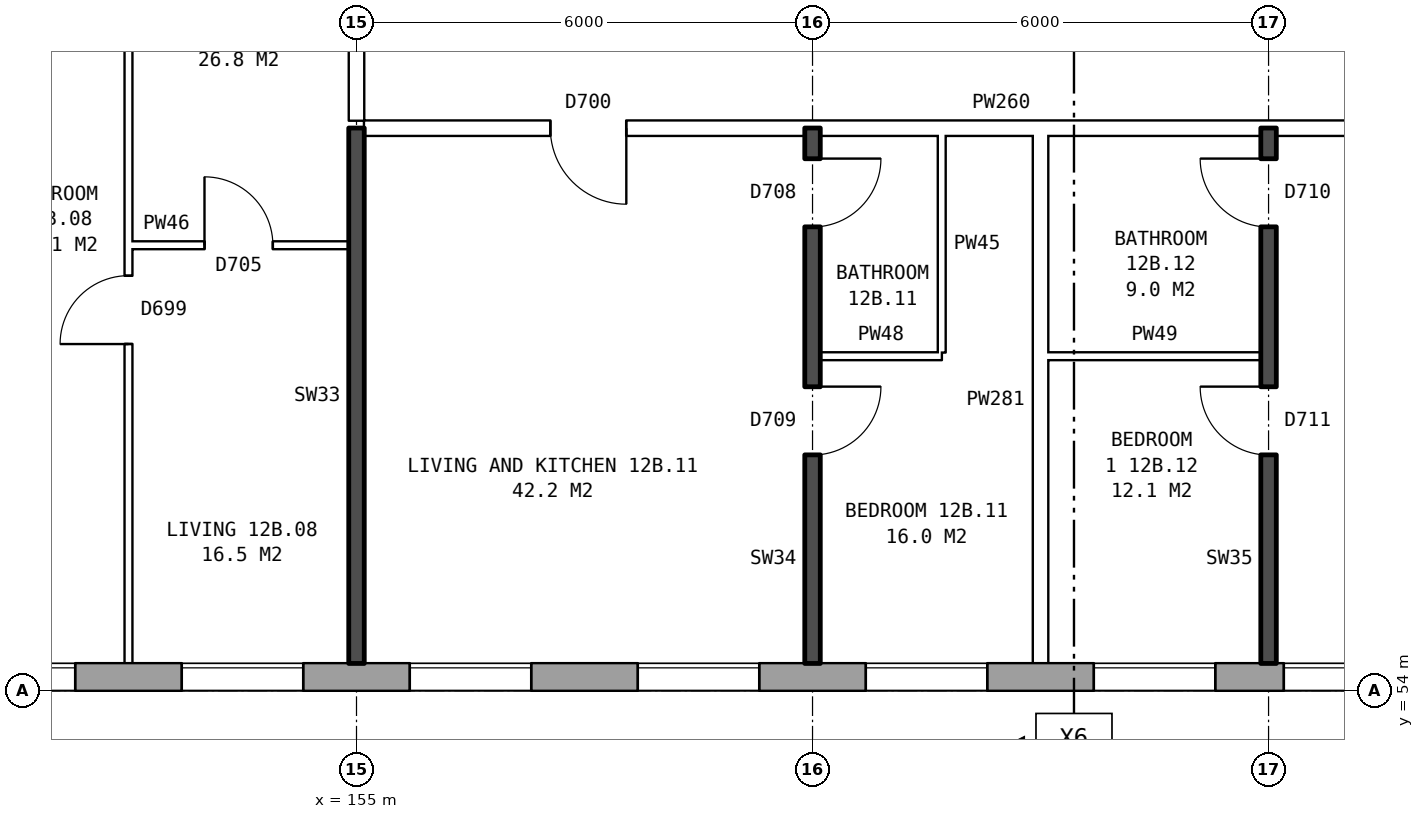
"""IFC4 building model, lengths in metres.
Left out: names, types, materials, properties, quantities, classifications, styles, units other than length and angle.
Written with IfcOpenShell. Run it as: python <this file> out.ifc"""

import sys

from ifc_helpers import new_model, si_unit, direction, frame, frame_2d, origin, place, context, subcontext, project, spatial, rectangle, extrude, element, fill, save


model = new_model("IFC4")
c1 = context("Model", 3, precision=1e-05, world=origin(), true_north=direction((0.0, 1.0)))
c2 = subcontext(c1, "Body", "Model", "MODEL_VIEW")
j1 = project(units=[si_unit("LENGTHUNIT", "METRE"), si_unit("PLANEANGLEUNIT", "RADIAN")], contexts=[c1])
p1 = place(None, origin())
s1 = spatial("IfcSite", under=j1, at=p1, CompositionType="ELEMENT")
p2 = place(p1, origin())
s2 = spatial("IfcBuilding", under=s1, at=p2, CompositionType="ELEMENT")
p3 = place(p2, frame((0.0, 0.0, 47.4)))
s3 = spatial("IfcBuildingStorey", under=s2, at=p3, CompositionType="ELEMENT", Elevation=47.4)
p4 = place(p3, frame((134.075, 54.18, 0.0), z_axis=(0.0, 0.0, 1.0), x_axis=(1.0, 0.0, 0.0)))
e1 = element("IfcWall", 1, at=p4, inside=s3, PredefinedType="STANDARD", context=c2, shape_type="SweptSolid", body=[
    extrude(rectangle(XDim=39.351, YDim=0.36, at=frame_2d((19.675, 0.0))), origin(), (0.0, 0.0, 1.0), 2.85),
])
p5 = place(p4, frame((0.3, 0.0, 0.8)))
e2 = element("IfcOpeningElement", 2, at=p5, cuts=e1, PredefinedType="OPENING", context=c2, shape_type="SweptSolid", body=[
    extrude(rectangle(XDim=1.2, YDim=1.8, at=frame_2d((0.6, 0.9))), frame((0.0, 0.19, 0.0), z_axis=(0.0, -1.0, 0.0), x_axis=(1.0, 0.0, 0.0)), (0.0, 0.0, 1.0), 0.38),
])
p6 = place(p4, frame((3.925, 0.0, 0.8)))
e3 = element("IfcOpeningElement", 3, at=p6, cuts=e1, PredefinedType="OPENING", context=c2, shape_type="SweptSolid", body=[
    extrude(rectangle(XDim=0.8, YDim=0.9, at=frame_2d((0.4, 0.45))), frame((0.0, 0.19, 0.0), z_axis=(0.0, -1.0, 0.0), x_axis=(1.0, 0.0, 0.0)), (0.0, 0.0, 1.0), 0.38),
])
p7 = place(p4, frame((6.625, 0.0, 0.8)))
e4 = element("IfcOpeningElement", 4, at=p7, cuts=e1, PredefinedType="OPENING", context=c2, shape_type="SweptSolid", body=[
    extrude(rectangle(XDim=1.6, YDim=1.8, at=frame_2d((0.8, 0.9))), frame((0.0, 0.19, 0.0), z_axis=(0.0, -1.0, 0.0), x_axis=(1.0, 0.0, 0.0)), (0.0, 0.0, 1.0), 0.38),
])
p8 = place(p4, frame((9.625, 0.0, 0.8)))
e5 = element("IfcOpeningElement", 5, at=p8, cuts=e1, PredefinedType="OPENING", context=c2, shape_type="SweptSolid", body=[
    extrude(rectangle(XDim=1.6, YDim=1.8, at=frame_2d((0.8, 0.9))), frame((0.0, 0.19, 0.0), z_axis=(0.0, -1.0, 0.0), x_axis=(1.0, 0.0, 0.0)), (0.0, 0.0, 1.0), 0.38),
])
p9 = place(p4, frame((12.625, 0.0, 0.8)))
e6 = element("IfcOpeningElement", 6, at=p9, cuts=e1, PredefinedType="OPENING", context=c2, shape_type="SweptSolid", body=[
    extrude(rectangle(XDim=1.6, YDim=1.8, at=frame_2d((0.8, 0.9))), frame((0.0, 0.19, 0.0), z_axis=(0.0, -1.0, 0.0), x_axis=(1.0, 0.0, 0.0)), (0.0, 0.0, 1.0), 0.38),
])
p10 = place(p4, frame((15.625, 0.0, 0.8)))
e7 = element("IfcOpeningElement", 7, at=p10, cuts=e1, PredefinedType="OPENING", context=c2, shape_type="SweptSolid", body=[
    extrude(rectangle(XDim=1.6, YDim=1.8, at=frame_2d((0.8, 0.9))), frame((0.0, 0.19, 0.0), z_axis=(0.0, -1.0, 0.0), x_axis=(1.0, 0.0, 0.0)), (0.0, 0.0, 1.0), 0.38),
])
p11 = place(p4, frame((18.625, 0.0, 0.8)))
e8 = element("IfcOpeningElement", 8, at=p11, cuts=e1, PredefinedType="OPENING", context=c2, shape_type="SweptSolid", body=[
    extrude(rectangle(XDim=1.6, YDim=1.8, at=frame_2d((0.8, 0.9))), frame((0.0, 0.19, 0.0), z_axis=(0.0, -1.0, 0.0), x_axis=(1.0, 0.0, 0.0)), (0.0, 0.0, 1.0), 0.38),
])
p12 = place(p4, frame((21.625, 0.0, 0.8)))
e9 = element("IfcOpeningElement", 9, at=p12, cuts=e1, PredefinedType="OPENING", context=c2, shape_type="SweptSolid", body=[
    extrude(rectangle(XDim=1.6, YDim=1.8, at=frame_2d((0.8, 0.9))), frame((0.0, 0.19, 0.0), z_axis=(0.0, -1.0, 0.0), x_axis=(1.0, 0.0, 0.0)), (0.0, 0.0, 1.0), 0.38),
])
p13 = place(p4, frame((24.625, 0.0, 0.8)))
e10 = element("IfcOpeningElement", 10, at=p13, cuts=e1, PredefinedType="OPENING", context=c2, shape_type="SweptSolid", body=[
    extrude(rectangle(XDim=1.6, YDim=1.8, at=frame_2d((0.8, 0.9))), frame((0.0, 0.19, 0.0), z_axis=(0.0, -1.0, 0.0), x_axis=(1.0, 0.0, 0.0)), (0.0, 0.0, 1.0), 0.38),
])
p14 = place(p4, frame((27.625, 0.0, 0.8)))
e11 = element("IfcOpeningElement", 11, at=p14, cuts=e1, PredefinedType="OPENING", context=c2, shape_type="SweptSolid", body=[
    extrude(rectangle(XDim=1.6, YDim=1.8, at=frame_2d((0.8, 0.9))), frame((0.0, 0.19, 0.0), z_axis=(0.0, -1.0, 0.0), x_axis=(1.0, 0.0, 0.0)), (0.0, 0.0, 1.0), 0.38),
])
p15 = place(p4, frame((30.625, 0.0, 0.8)))
e12 = element("IfcOpeningElement", 12, at=p15, cuts=e1, PredefinedType="OPENING", context=c2, shape_type="SweptSolid", body=[
    extrude(rectangle(XDim=1.6, YDim=1.8, at=frame_2d((0.8, 0.9))), frame((0.0, 0.19, 0.0), z_axis=(0.0, -1.0, 0.0), x_axis=(1.0, 0.0, 0.0)), (0.0, 0.0, 1.0), 0.38),
])
p16 = place(p4, frame((33.125, 0.0, 0.8)))
e13 = element("IfcOpeningElement", 13, at=p16, cuts=e1, PredefinedType="OPENING", context=c2, shape_type="SweptSolid", body=[
    extrude(rectangle(XDim=1.2, YDim=1.8, at=frame_2d((0.6, 0.9))), frame((0.0, 0.19, 0.0), z_axis=(0.0, -1.0, 0.0), x_axis=(1.0, 0.0, 0.0)), (0.0, 0.0, 1.0), 0.38),
])
p17 = place(p4, frame((34.625, 0.0, 0.8)))
e14 = element("IfcOpeningElement", 14, at=p17, cuts=e1, PredefinedType="OPENING", context=c2, shape_type="SweptSolid", body=[
    extrude(rectangle(XDim=0.8, YDim=0.9, at=frame_2d((0.4, 0.45))), frame((0.0, 0.19, 0.0), z_axis=(0.0, -1.0, 0.0), x_axis=(1.0, 0.0, 0.0)), (0.0, 0.0, 1.0), 0.38),
])
p18 = place(p4, frame((1.8, 0.0, 1.6)))
e15 = element("IfcOpeningElement", 15, at=p18, cuts=e1, PredefinedType="OPENING", context=c2, shape_type="SweptSolid", body=[
    extrude(rectangle(XDim=0.8, YDim=0.9, at=frame_2d((0.4, 0.45))), frame((0.0, 0.19, 0.0), z_axis=(0.0, -1.0, 0.0), x_axis=(1.0, 0.0, 0.0)), (0.0, 0.0, 1.0), 0.38),
])
p19 = place(p4, frame((5.025, 0.0, 0.8)))
e16 = element("IfcOpeningElement", 16, at=p19, cuts=e1, PredefinedType="OPENING", context=c2, shape_type="SweptSolid", body=[
    extrude(rectangle(XDim=1.2, YDim=1.8, at=frame_2d((0.6, 0.9))), frame((0.0, 0.19, 0.0), z_axis=(0.0, -1.0, 0.0), x_axis=(1.0, 0.0, 0.0)), (0.0, 0.0, 1.0), 0.38),
])
p20 = place(p4, frame((36.625, 0.0, 1.7)))
e17 = element("IfcOpeningElement", 17, at=p20, cuts=e1, PredefinedType="OPENING", context=c2, shape_type="SweptSolid", body=[
    extrude(rectangle(XDim=0.8, YDim=0.9, at=frame_2d((0.4, 0.45))), frame((0.0, 0.19, 0.0), z_axis=(0.0, -1.0, 0.0), x_axis=(1.0, 0.0, 0.0)), (0.0, 0.0, 1.0), 0.38),
])
p21 = place(p4, frame((37.725, 0.0, 0.8)))
e18 = element("IfcOpeningElement", 18, at=p21, cuts=e1, PredefinedType="OPENING", context=c2, shape_type="SweptSolid", body=[
    extrude(rectangle(XDim=1.0, YDim=1.8, at=frame_2d((0.5, 0.9))), frame((0.0, 0.19, 0.0), z_axis=(0.0, -1.0, 0.0), x_axis=(1.0, 0.0, 0.0)), (0.0, 0.0, 1.0), 0.38),
])
p22 = place(p3, frame((161.1, 58.4, 0.0), z_axis=(0.0, 0.0, 1.0), x_axis=(1.0, 0.0, 0.0)))
e19 = element("IfcWall", 19, at=p22, inside=s3, PredefinedType="PARTITIONING", context=c2, shape_type="SweptSolid", body=[
    extrude(rectangle(XDim=1.6, YDim=0.1, at=frame_2d((0.8, 0.0))), origin(), (0.0, 0.0, 1.0), 2.85),
])
p23 = place(p3, frame((164.1, 58.4, 0.0), z_axis=(0.0, 0.0, 1.0), x_axis=(1.0, 0.0, 0.0)))
e20 = element("IfcWall", 20, at=p23, inside=s3, PredefinedType="PARTITIONING", context=c2, shape_type="SweptSolid", body=[
    extrude(rectangle(XDim=2.8, YDim=0.1, at=frame_2d((1.4, 0.0))), origin(), (0.0, 0.0, 1.0), 2.85),
])
p24 = place(p3, frame((152.0, 59.86, 0.0), z_axis=(0.0, 0.0, 1.0), x_axis=(1.0, 0.0, 0.0)))
e21 = element("IfcWall", 21, at=p24, inside=s3, PredefinedType="PARTITIONING", context=c2, shape_type="SweptSolid", body=[
    extrude(rectangle(XDim=2.9, YDim=0.1, at=frame_2d((1.45, 0.0))), origin(), (0.0, 0.0, 1.0), 2.85),
])
p25 = place(p24, frame((1.0, 0.0, 0.0)))
e22 = element("IfcOpeningElement", 22, at=p25, cuts=e21, PredefinedType="OPENING", context=c2, shape_type="SweptSolid", body=[
    extrude(rectangle(XDim=0.9, YDim=2.1, at=frame_2d((0.45, 1.05))), frame((0.0, 0.06, 0.0), z_axis=(0.0, -1.0, 0.0), x_axis=(1.0, 0.0, 0.0)), (0.0, 0.0, 1.0), 0.12),
])
p26 = place(p3, frame((155.1, 61.4, 0.0), z_axis=(0.0, 0.0, 1.0), x_axis=(1.0, 0.0, 0.0)))
e23 = element("IfcWall", 23, at=p26, inside=s3, PredefinedType="PARTITIONING", context=c2, shape_type="SweptSolid", body=[
    extrude(rectangle(XDim=21.04, YDim=0.2, at=frame_2d((10.52, 0.0))), origin(), (0.0, 0.0, 1.0), 2.85),
])
p27 = place(p26, frame((2.45, 0.0, 0.0)))
e24 = element("IfcOpeningElement", 24, at=p27, cuts=e23, PredefinedType="OPENING", context=c2, shape_type="SweptSolid", body=[
    extrude(rectangle(XDim=1.0, YDim=2.1, at=frame_2d((0.5, 1.05))), frame((0.0, 0.11, 0.0), z_axis=(0.0, -1.0, 0.0), x_axis=(1.0, 0.0, 0.0)), (0.0, 0.0, 1.0), 0.22),
])
p28 = place(p26, frame((14.4, 0.0, 0.0)))
e25 = element("IfcOpeningElement", 25, at=p28, cuts=e23, PredefinedType="OPENING", context=c2, shape_type="SweptSolid", body=[
    extrude(rectangle(XDim=1.0, YDim=2.1, at=frame_2d((0.5, 1.05))), frame((0.0, 0.11, 0.0), z_axis=(0.0, -1.0, 0.0), x_axis=(1.0, 0.0, 0.0)), (0.0, 0.0, 1.0), 0.22),
])
p29 = place(p3, frame((152.0, 54.36, 0.0), z_axis=(0.0, 0.0, 1.0), x_axis=(0.0, 1.0, 0.0)))
e26 = element("IfcWall", 26, at=p29, inside=s3, PredefinedType="PARTITIONING", context=c2, shape_type="SweptSolid", body=[
    extrude(rectangle(XDim=14.34, YDim=0.1, at=frame_2d((7.17, 0.0))), origin(), (0.0, 0.0, 1.0), 2.85),
])
p30 = place(p29, frame((4.2, 0.0, 0.0)))
e27 = element("IfcOpeningElement", 27, at=p30, cuts=e26, PredefinedType="OPENING", context=c2, shape_type="SweptSolid", body=[
    extrude(rectangle(XDim=0.9, YDim=2.1, at=frame_2d((0.45, 1.05))), frame((0.0, 0.06, 0.0), z_axis=(0.0, -1.0, 0.0), x_axis=(1.0, 0.0, 0.0)), (0.0, 0.0, 1.0), 0.12),
])
p31 = place(p29, frame((13.04, 0.0, 0.0)))
e28 = element("IfcOpeningElement", 28, at=p31, cuts=e26, PredefinedType="OPENING", context=c2, shape_type="SweptSolid", body=[
    extrude(rectangle(XDim=0.9, YDim=2.1, at=frame_2d((0.45, 1.05))), frame((0.0, 0.06, 0.0), z_axis=(0.0, -1.0, 0.0), x_axis=(1.0, 0.0, 0.0)), (0.0, 0.0, 1.0), 0.12),
])
p32 = place(p3, frame((155.0, 54.36, 0.0), z_axis=(0.0, 0.0, 1.0), x_axis=(0.0, 1.0, 0.0)))
e29 = element("IfcWall", 29, at=p32, inside=s3, PredefinedType="SOLIDWALL", context=c2, shape_type="SweptSolid", body=[
    extrude(rectangle(XDim=7.04, YDim=0.2, at=frame_2d((3.52, 0.0))), origin(), (0.0, 0.0, 1.0), 2.85),
])
p33 = place(p3, frame((155.0, 61.5, 0.0), z_axis=(0.0, 0.0, 1.0), x_axis=(0.0, 1.0, 0.0)))
e30 = element("IfcWall", 30, at=p33, inside=s3, PredefinedType="PARTITIONING", context=c2, shape_type="SweptSolid", body=[
    extrude(rectangle(XDim=2.2, YDim=0.2, at=frame_2d((1.1, 0.0))), origin(), (0.0, 0.0, 1.0), 2.85),
])
p34 = place(p3, frame((161.0, 54.36, 0.0), z_axis=(0.0, 0.0, 1.0), x_axis=(0.0, 1.0, 0.0)))
e31 = element("IfcWall", 31, at=p34, inside=s3, PredefinedType="SOLIDWALL", context=c2, shape_type="SweptSolid", body=[
    extrude(rectangle(XDim=7.04, YDim=0.2, at=frame_2d((3.52, 0.0))), origin(), (0.0, 0.0, 1.0), 2.85),
])
p35 = place(p34, frame((2.74, 0.0, 0.0)))
e32 = element("IfcOpeningElement", 32, at=p35, cuts=e31, PredefinedType="OPENING", context=c2, shape_type="SweptSolid", body=[
    extrude(rectangle(XDim=0.9, YDim=2.1, at=frame_2d((0.45, 1.05))), frame((0.0, 0.11, 0.0), z_axis=(0.0, -1.0, 0.0), x_axis=(1.0, 0.0, 0.0)), (0.0, 0.0, 1.0), 0.22),
])
p36 = place(p34, frame((5.74, 0.0, 0.0)))
e33 = element("IfcOpeningElement", 33, at=p36, cuts=e31, PredefinedType="OPENING", context=c2, shape_type="SweptSolid", body=[
    extrude(rectangle(XDim=0.9, YDim=2.1, at=frame_2d((0.45, 1.05))), frame((0.0, 0.11, 0.0), z_axis=(0.0, -1.0, 0.0), x_axis=(1.0, 0.0, 0.0)), (0.0, 0.0, 1.0), 0.22),
])
p37 = place(p3, frame((162.7, 58.45, 0.0), z_axis=(0.0, 0.0, 1.0), x_axis=(0.0, 1.0, 0.0)))
e34 = element("IfcWall", 34, at=p37, inside=s3, PredefinedType="PARTITIONING", context=c2, shape_type="SweptSolid", body=[
    extrude(rectangle(XDim=2.85, YDim=0.1, at=frame_2d((1.425, 0.0))), origin(), (0.0, 0.0, 1.0), 2.85),
])
p38 = place(p3, frame((164.0, 54.36, 0.0), z_axis=(0.0, 0.0, 1.0), x_axis=(0.0, 1.0, 0.0)))
e35 = element("IfcWall", 35, at=p38, inside=s3, PredefinedType="PARTITIONING", context=c2, shape_type="SweptSolid", body=[
    extrude(rectangle(XDim=6.94, YDim=0.2, at=frame_2d((3.47, 0.0))), origin(), (0.0, 0.0, 1.0), 2.85),
])
p39 = place(p3, frame((167.0, 54.36, 0.0), z_axis=(0.0, 0.0, 1.0), x_axis=(0.0, 1.0, 0.0)))
e36 = element("IfcWall", 36, at=p39, inside=s3, PredefinedType="SOLIDWALL", context=c2, shape_type="SweptSolid", body=[
    extrude(rectangle(XDim=7.04, YDim=0.2, at=frame_2d((3.52, 0.0))), origin(), (0.0, 0.0, 1.0), 2.85),
])
p40 = place(p39, frame((2.74, 0.0, 0.0)))
e37 = element("IfcOpeningElement", 37, at=p40, cuts=e36, PredefinedType="OPENING", context=c2, shape_type="SweptSolid", body=[
    extrude(rectangle(XDim=0.9, YDim=2.1, at=frame_2d((0.45, 1.05))), frame((0.0, 0.11, 0.0), z_axis=(0.0, -1.0, 0.0), x_axis=(1.0, 0.0, 0.0)), (0.0, 0.0, 1.0), 0.22),
])
p41 = place(p39, frame((5.74, 0.0, 0.0)))
e38 = element("IfcOpeningElement", 38, at=p41, cuts=e36, PredefinedType="OPENING", context=c2, shape_type="SweptSolid", body=[
    extrude(rectangle(XDim=0.9, YDim=2.1, at=frame_2d((0.45, 1.05))), frame((0.0, 0.11, 0.0), z_axis=(0.0, -1.0, 0.0), x_axis=(1.0, 0.0, 0.0)), (0.0, 0.0, 1.0), 0.22),
])
p42 = place(p10, origin())
e39 = element("IfcWindow", 39, at=p42, inside=s3, PartitioningType="SINGLE_PANEL", PredefinedType="WINDOW", context=c2, shape_type="SweptSolid", body=[
    extrude(rectangle(XDim=1.6, YDim=1.8, at=frame_2d((0.8, 0.9))), frame((0.0, 0.15, 0.0), z_axis=(0.0, -1.0, 0.0), x_axis=(1.0, 0.0, 0.0)), (0.0, 0.0, 1.0), 0.06),
])
fill(e7, e39)
p43 = place(p11, origin())
e40 = element("IfcWindow", 40, at=p43, inside=s3, PartitioningType="SINGLE_PANEL", PredefinedType="WINDOW", context=c2, shape_type="SweptSolid", body=[
    extrude(rectangle(XDim=1.6, YDim=1.8, at=frame_2d((0.8, 0.9))), frame((0.0, 0.15, 0.0), z_axis=(0.0, -1.0, 0.0), x_axis=(1.0, 0.0, 0.0)), (0.0, 0.0, 1.0), 0.06),
])
fill(e8, e40)
p44 = place(p12, origin())
e41 = element("IfcWindow", 41, at=p44, inside=s3, PartitioningType="SINGLE_PANEL", PredefinedType="WINDOW", context=c2, shape_type="SweptSolid", body=[
    extrude(rectangle(XDim=1.6, YDim=1.8, at=frame_2d((0.8, 0.9))), frame((0.0, 0.15, 0.0), z_axis=(0.0, -1.0, 0.0), x_axis=(1.0, 0.0, 0.0)), (0.0, 0.0, 1.0), 0.06),
])
fill(e9, e41)
p45 = place(p13, origin())
e42 = element("IfcWindow", 42, at=p45, inside=s3, PartitioningType="SINGLE_PANEL", PredefinedType="WINDOW", context=c2, shape_type="SweptSolid", body=[
    extrude(rectangle(XDim=1.6, YDim=1.8, at=frame_2d((0.8, 0.9))), frame((0.0, 0.15, 0.0), z_axis=(0.0, -1.0, 0.0), x_axis=(1.0, 0.0, 0.0)), (0.0, 0.0, 1.0), 0.06),
])
fill(e10, e42)
p46 = place(p14, origin())
e43 = element("IfcWindow", 43, at=p46, inside=s3, PartitioningType="SINGLE_PANEL", PredefinedType="WINDOW", context=c2, shape_type="SweptSolid", body=[
    extrude(rectangle(XDim=1.6, YDim=1.8, at=frame_2d((0.8, 0.9))), frame((0.0, 0.15, 0.0), z_axis=(0.0, -1.0, 0.0), x_axis=(1.0, 0.0, 0.0)), (0.0, 0.0, 1.0), 0.06),
])
fill(e11, e43)
p47 = place(p15, origin())
e44 = element("IfcWindow", 44, at=p47, inside=s3, PartitioningType="SINGLE_PANEL", PredefinedType="WINDOW", context=c2, shape_type="SweptSolid", body=[
    extrude(rectangle(XDim=1.6, YDim=1.8, at=frame_2d((0.8, 0.9))), frame((0.0, 0.15, 0.0), z_axis=(0.0, -1.0, 0.0), x_axis=(1.0, 0.0, 0.0)), (0.0, 0.0, 1.0), 0.06),
])
fill(e12, e44)
p48 = place(p16, origin())
e45 = element("IfcWindow", 45, at=p48, inside=s3, PartitioningType="SINGLE_PANEL", PredefinedType="WINDOW", context=c2, shape_type="SweptSolid", body=[
    extrude(rectangle(XDim=1.2, YDim=1.8, at=frame_2d((0.6, 0.9))), frame((0.0, 0.15, 0.0), z_axis=(0.0, -1.0, 0.0), x_axis=(1.0, 0.0, 0.0)), (0.0, 0.0, 1.0), 0.06),
])
fill(e13, e45)
p49 = place(p30, origin())
e46 = element("IfcDoor", 46, at=p49, inside=s3, OperationType="SINGLE_SWING_LEFT", PredefinedType="DOOR", context=c2, shape_type="SweptSolid", body=[
    extrude(rectangle(XDim=0.9, YDim=2.1, at=frame_2d((0.45, 1.05))), frame((0.0, 0.025, 0.0), z_axis=(0.0, -1.0, 0.0), x_axis=(1.0, 0.0, 0.0)), (0.0, 0.0, 1.0), 0.05),
])
fill(e27, e46)
p50 = place(p25, origin())
e47 = element("IfcDoor", 47, at=p50, inside=s3, OperationType="SINGLE_SWING_LEFT", PredefinedType="DOOR", context=c2, shape_type="SweptSolid", body=[
    extrude(rectangle(XDim=0.9, YDim=2.1, at=frame_2d((0.45, 1.05))), frame((0.0, 0.025, 0.0), z_axis=(0.0, -1.0, 0.0), x_axis=(1.0, 0.0, 0.0)), (0.0, 0.0, 1.0), 0.05),
])
fill(e22, e47)
p51 = place(p35, frame((0.9, 0.0, 0.0), z_axis=(0.0, 0.0, 1.0), x_axis=(-1.0, 0.0, 0.0)))
e48 = element("IfcDoor", 48, at=p51, inside=s3, OperationType="SINGLE_SWING_LEFT", PredefinedType="DOOR", context=c2, shape_type="SweptSolid", body=[
    extrude(rectangle(XDim=0.9, YDim=2.1, at=frame_2d((0.45, 1.05))), frame((0.0, 0.025, 0.0), z_axis=(0.0, -1.0, 0.0), x_axis=(1.0, 0.0, 0.0)), (0.0, 0.0, 1.0), 0.05),
])
fill(e32, e48)
p52 = place(p27, frame((1.0, 0.0, 0.0), z_axis=(0.0, 0.0, 1.0), x_axis=(-1.0, 0.0, 0.0)))
e49 = element("IfcDoor", 49, at=p52, inside=s3, OperationType="SINGLE_SWING_LEFT", PredefinedType="DOOR", context=c2, shape_type="SweptSolid", body=[
    extrude(rectangle(XDim=1.0, YDim=2.1, at=frame_2d((0.5, 1.05))), frame((0.0, 0.025, 0.0), z_axis=(0.0, -1.0, 0.0), x_axis=(1.0, 0.0, 0.0)), (0.0, 0.0, 1.0), 0.05),
])
fill(e24, e49)
p53 = place(p36, frame((0.9, 0.0, 0.0), z_axis=(0.0, 0.0, 1.0), x_axis=(-1.0, 0.0, 0.0)))
e50 = element("IfcDoor", 50, at=p53, inside=s3, OperationType="SINGLE_SWING_LEFT", PredefinedType="DOOR", context=c2, shape_type="SweptSolid", body=[
    extrude(rectangle(XDim=0.9, YDim=2.1, at=frame_2d((0.45, 1.05))), frame((0.0, 0.025, 0.0), z_axis=(0.0, -1.0, 0.0), x_axis=(1.0, 0.0, 0.0)), (0.0, 0.0, 1.0), 0.05),
])
fill(e33, e50)
p54 = place(p40, origin())
e51 = element("IfcDoor", 51, at=p54, inside=s3, OperationType="SINGLE_SWING_RIGHT", PredefinedType="DOOR", context=c2, shape_type="SweptSolid", body=[
    extrude(rectangle(XDim=0.9, YDim=2.1, at=frame_2d((0.45, 1.05))), frame((0.0, 0.025, 0.0), z_axis=(0.0, -1.0, 0.0), x_axis=(1.0, 0.0, 0.0)), (0.0, 0.0, 1.0), 0.05),
])
fill(e37, e51)
p55 = place(p41, origin())
e52 = element("IfcDoor", 52, at=p55, inside=s3, OperationType="SINGLE_SWING_RIGHT", PredefinedType="DOOR", context=c2, shape_type="SweptSolid", body=[
    extrude(rectangle(XDim=0.9, YDim=2.1, at=frame_2d((0.45, 1.05))), frame((0.0, 0.025, 0.0), z_axis=(0.0, -1.0, 0.0), x_axis=(1.0, 0.0, 0.0)), (0.0, 0.0, 1.0), 0.05),
])
fill(e38, e52)
save(model, sys.argv[1])
